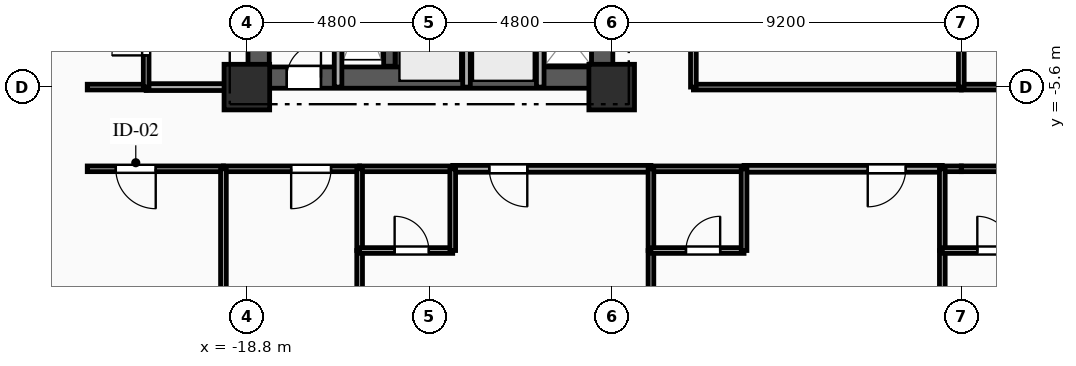
"""IFC4 building model, lengths in metres.
Left out: names, types, materials, properties, quantities, classifications, styles, units other than length and angle.
Written with IfcOpenShell. Run it as: python <this file> out.ifc"""

import sys

from ifc_helpers import new_model, si_unit, direction, frame, frame_2d, origin, origin_2d, place, context, subcontext, project, spatial, rectangle, extrude, element, fill, save


model = new_model("IFC4")
c1 = context("Model", 3, precision=1e-05, world=origin(), true_north=direction((0.0, 1.0)))
c2 = subcontext(c1, "Body", "Model", "MODEL_VIEW")
j1 = project(units=[si_unit("LENGTHUNIT", "METRE"), si_unit("PLANEANGLEUNIT", "RADIAN")], contexts=[c1])
p1 = place(None, origin())
s1 = spatial("IfcSite", under=j1, at=p1, CompositionType="ELEMENT")
p2 = place(p1, origin())
s2 = spatial("IfcBuilding", under=s1, at=p2, CompositionType="ELEMENT")
p3 = place(p2, frame((0.0, 0.0, 30.35)))
s3 = spatial("IfcBuildingStorey", under=s2, at=p3, CompositionType="ELEMENT", Elevation=30.35)
for number, where, z_axis, x_axis in (
    (1, (-18.8, -5.6, 0.0), (0.0, 0.0, 1.0), (1.0, 0.0, 0.0)),
    (2, (-9.2, -5.6, 0.0), (0.0, 0.0, 1.0), (1.0, 0.0, 0.0)),
):
    element("IfcColumn", number, at=place(p3, frame(where, z_axis=z_axis, x_axis=x_axis)), inside=s3, PredefinedType="COLUMN", context=c2, shape_type="SweptSolid", body=[
        extrude(rectangle(XDim=1.2, YDim=1.2, at=origin_2d()), origin(), (0.0, 0.0, 1.0), 3.35),
    ])
p4 = place(p3, frame((-18.8, -5.35, 0.0), z_axis=(0.0, 0.0, 1.0), x_axis=(1.0, 0.0, 0.0)))
e3 = element("IfcWall", 3, at=p4, inside=s3, PredefinedType="SHEAR", context=c2, shape_type="SweptSolid", body=[
    extrude(rectangle(XDim=9.6, YDim=0.56, at=frame_2d((4.8, 0.0))), origin(), (0.0, 0.0, 1.0), 3.035),
])
p5 = place(p4, frame((1.05, 0.0, 0.0)))
e4 = element("IfcOpeningElement", 4, at=p5, cuts=e3, PredefinedType="OPENING", context=c2, shape_type="SweptSolid", body=[
    extrude(rectangle(XDim=0.9, YDim=2.1, at=frame_2d((0.45, 1.05))), frame((0.0, 0.29, 0.0), z_axis=(0.0, -1.0, 0.0), x_axis=(1.0, 0.0, 0.0)), (0.0, 0.0, 1.0), 0.58),
])
p6 = place(p3, frame((-18.49, -5.05, 0.0), z_axis=(0.0, 0.0, 1.0), x_axis=(0.0, 1.0, 0.0)))
e5 = element("IfcWall", 5, at=p6, inside=s3, PredefinedType="SHEAR", context=c2, shape_type="SweptSolid", body=[
    extrude(rectangle(XDim=10.1, YDim=0.56, at=frame_2d((5.05, 0.0))), origin(), (0.0, 0.0, 1.0), 3.035),
])
p7 = place(p3, frame((-9.45, -5.05, 0.0), z_axis=(0.0, 0.0, 1.0), x_axis=(0.0, 1.0, 0.0)))
e6 = element("IfcWall", 6, at=p7, inside=s3, PredefinedType="SHEAR", context=c2, shape_type="SweptSolid", body=[
    extrude(rectangle(XDim=10.1, YDim=0.56, at=frame_2d((5.05, 0.0))), origin(), (0.0, 0.0, 1.0), 3.035),
])
p8 = place(p7, frame((7.15, 0.0, 0.0)))
e7 = element("IfcOpeningElement", 7, at=p8, cuts=e6, PredefinedType="OPENING", context=c2, shape_type="SweptSolid", body=[
    extrude(rectangle(XDim=0.9, YDim=2.1, at=frame_2d((0.45, 1.05))), frame((0.0, 0.29, 0.0), z_axis=(0.0, -1.0, 0.0), x_axis=(1.0, 0.0, 0.0)), (0.0, 0.0, 1.0), 0.58),
])
p9 = place(p7, frame((2.4, 0.0, 0.0)))
e8 = element("IfcOpeningElement", 8, at=p9, cuts=e6, PredefinedType="OPENING", context=c2, shape_type="SweptSolid", body=[
    extrude(rectangle(XDim=1.2, YDim=2.15, at=frame_2d((0.6, 1.075))), frame((0.0, 0.29, 0.0), z_axis=(0.0, -1.0, 0.0), x_axis=(1.0, 0.0, 0.0)), (0.0, 0.0, 1.0), 0.58),
])
p10 = place(p3, frame((-15.05, -5.05, 0.0), z_axis=(0.0, 0.0, 1.0), x_axis=(0.0, 1.0, 0.0)))
e9 = element("IfcWall", 9, at=p10, inside=s3, PredefinedType="SHEAR", context=c2, shape_type="SweptSolid", body=[
    extrude(rectangle(XDim=10.1, YDim=0.3, at=frame_2d((5.05, 0.0))), origin(), (0.0, 0.0, 1.0), 3.035),
])
p11 = place(p3, frame((-16.4, -5.6, 0.0), z_axis=(0.0, 0.0, 1.0), x_axis=(0.0, 1.0, 0.0)))
e10 = element("IfcWall", 10, at=p11, inside=s3, PredefinedType="PARTITIONING", context=c2, shape_type="SweptSolid", body=[
    extrude(rectangle(XDim=3.49, YDim=0.2, at=frame_2d((1.745, 0.0))), origin(), (0.0, 0.0, 1.0), 3.035),
])
for number, where, z_axis, x_axis in (
    (11, (-13.02, -5.6, 0.0), (0.0, 0.0, 1.0), (0.0, 1.0, 0.0)),
    (12, (-11.08, -5.6, 0.0), (0.0, 0.0, 1.0), (0.0, 1.0, 0.0)),
):
    element("IfcWall", number, at=place(p3, frame(where, z_axis=z_axis, x_axis=x_axis)), inside=s3, PredefinedType="PARTITIONING", context=c2, shape_type="SweptSolid", body=[
        extrude(rectangle(XDim=2.25, YDim=0.2, at=frame_2d((1.125, 0.0))), origin(), (0.0, 0.0, 1.0), 3.035),
    ])
p12 = place(p3, frame((-21.45, -5.6, 0.0), z_axis=(0.0, 0.0, 1.0), x_axis=(1.0, 0.0, 0.0)))
e13 = element("IfcWall", 13, at=p12, inside=s3, PredefinedType="PARTITIONING", context=c2, shape_type="SweptSolid", body=[
    extrude(rectangle(XDim=2.65, YDim=0.18, at=frame_2d((1.325, 0.0))), origin(), (0.0, 0.0, 1.0), 3.035),
])
p13 = place(p3, frame((-23.0, -5.6, 0.0), z_axis=(0.0, 0.0, 1.0), x_axis=(1.0, 0.0, 0.0)))
e14 = element("IfcWall", 14, at=p13, inside=s3, PredefinedType="PLUMBINGWALL", context=c2, shape_type="SweptSolid", body=[
    extrude(rectangle(XDim=1.55, YDim=0.15, at=frame_2d((0.775, 0.0))), origin(), (0.0, 0.0, 1.0), 3.035),
])
p14 = place(p3, frame((-19.417, -7.75, 0.0), z_axis=(0.0, 0.0, 1.0), x_axis=(-1.0, 0.0, 0.0)))
e15 = element("IfcWall", 15, at=p14, inside=s3, PredefinedType="PARTITIONING", context=c2, shape_type="SweptSolid", body=[
    extrude(rectangle(XDim=3.583, YDim=0.15, at=frame_2d((1.792, 0.0))), origin(), (0.0, 0.0, 1.0), 3.035),
])
p15 = place(p14, frame((1.782, 0.0, 0.0)))
e16 = element("IfcOpeningElement", 16, at=p15, cuts=e15, PredefinedType="OPENING", context=c2, shape_type="SweptSolid", body=[
    extrude(rectangle(XDim=1.05, YDim=2.15, at=frame_2d((0.525, 1.075))), frame((0.0, 0.085, 0.0), z_axis=(0.0, -1.0, 0.0), x_axis=(1.0, 0.0, 0.0)), (0.0, 0.0, 1.0), 0.17),
])
p16 = place(p3, frame((-15.833, -7.75, 0.0), z_axis=(0.0, 0.0, 1.0), x_axis=(-1.0, 0.0, 0.0)))
e17 = element("IfcWall", 17, at=p16, inside=s3, PredefinedType="PARTITIONING", context=c2, shape_type="SweptSolid", body=[
    extrude(rectangle(XDim=3.583, YDim=0.15, at=frame_2d((1.792, 0.0))), origin(), (0.0, 0.0, 1.0), 3.035),
])
p17 = place(p16, frame((0.752, 0.0, 0.0)))
e18 = element("IfcOpeningElement", 18, at=p17, cuts=e17, PredefinedType="OPENING", context=c2, shape_type="SweptSolid", body=[
    extrude(rectangle(XDim=1.05, YDim=2.15, at=frame_2d((0.525, 1.075))), frame((0.0, 0.085, 0.0), z_axis=(0.0, -1.0, 0.0), x_axis=(1.0, 0.0, 0.0)), (0.0, 0.0, 1.0), 0.17),
])
p18 = place(p3, frame((-8.167, -7.75, 0.0), z_axis=(0.0, 0.0, 1.0), x_axis=(-1.0, 0.0, 0.0)))
e19 = element("IfcWall", 19, at=p18, inside=s3, PredefinedType="PARTITIONING", context=c2, shape_type="SweptSolid", body=[
    extrude(rectangle(XDim=5.216, YDim=0.18, at=frame_2d((2.608, 0.0))), origin(), (0.0, 0.0, 1.0), 3.035),
])
p19 = place(p18, frame((3.254, 0.0, 0.0)))
e20 = element("IfcOpeningElement", 20, at=p19, cuts=e19, PredefinedType="OPENING", context=c2, shape_type="SweptSolid", body=[
    extrude(rectangle(XDim=1.0, YDim=2.15, at=frame_2d((0.5, 1.075))), frame((0.0, 0.1, 0.0), z_axis=(0.0, -1.0, 0.0), x_axis=(1.0, 0.0, 0.0)), (0.0, 0.0, 1.0), 0.2),
])
p20 = place(p3, frame((-13.383, -7.75, 0.0), z_axis=(0.0, 0.0, 1.0), x_axis=(-1.0, 0.0, 0.0)))
e21 = element("IfcWall", 21, at=p20, inside=s3, PredefinedType="PLUMBINGWALL", context=c2, shape_type="SweptSolid", body=[
    extrude(rectangle(XDim=2.45, YDim=0.15, at=frame_2d((1.225, 0.0))), origin(), (0.0, 0.0, 1.0), 3.035),
])
p21 = place(p3, frame((-0.5, -7.75, 0.0), z_axis=(0.0, 0.0, 1.0), x_axis=(-1.0, 0.0, 0.0)))
e22 = element("IfcWall", 22, at=p21, inside=s3, PredefinedType="PARTITIONING", context=c2, shape_type="SweptSolid", body=[
    extrude(rectangle(XDim=5.217, YDim=0.18, at=frame_2d((2.608, 0.0))), origin(), (0.0, 0.0, 1.0), 3.035),
])
p22 = place(p21, frame((0.962, 0.0, 0.0)))
e23 = element("IfcOpeningElement", 23, at=p22, cuts=e22, PredefinedType="OPENING", context=c2, shape_type="SweptSolid", body=[
    extrude(rectangle(XDim=1.0, YDim=2.15, at=frame_2d((0.5, 1.075))), frame((0.0, 0.1, 0.0), z_axis=(0.0, -1.0, 0.0), x_axis=(1.0, 0.0, 0.0)), (0.0, 0.0, 1.0), 0.2),
])
p23 = place(p3, frame((-5.717, -7.75, 0.0), z_axis=(0.0, 0.0, 1.0), x_axis=(-1.0, 0.0, 0.0)))
e24 = element("IfcWall", 24, at=p23, inside=s3, PredefinedType="PLUMBINGWALL", context=c2, shape_type="SweptSolid", body=[
    extrude(rectangle(XDim=2.45, YDim=0.15, at=frame_2d((1.225, 0.0))), origin(), (0.0, 0.0, 1.0), 3.035),
])
p24 = place(p3, frame((0.0, -7.75, 0.0), z_axis=(0.0, 0.0, 1.0), x_axis=(-1.0, 0.0, 0.0)))
e25 = element("IfcWall", 25, at=p24, inside=s3, PredefinedType="PLUMBINGWALL", context=c2, shape_type="SweptSolid", body=[
    extrude(rectangle(XDim=0.5, YDim=0.15, at=frame_2d((0.25, 0.0))), origin(), (0.0, 0.0, 1.0), 3.035),
])
p25 = place(p3, frame((-7.05, -5.6, 0.0), z_axis=(0.0, 0.0, 1.0), x_axis=(1.0, 0.0, 0.0)))
e26 = element("IfcWall", 26, at=p25, inside=s3, PredefinedType="PARTITIONING", context=c2, shape_type="SweptSolid", body=[
    extrude(rectangle(XDim=7.05, YDim=0.15, at=frame_2d((3.525, 0.0))), origin(), (0.0, 0.0, 1.0), 2.52),
])
p26 = place(p3, frame((1.95, -7.75, 0.0), z_axis=(0.0, 0.0, 1.0), x_axis=(-1.0, 0.0, 0.0)))
e27 = element("IfcWall", 27, at=p26, inside=s3, PredefinedType="PLUMBINGWALL", context=c2, shape_type="SweptSolid", body=[
    extrude(rectangle(XDim=1.95, YDim=0.15, at=frame_2d((0.975, 0.0))), origin(), (0.0, 0.0, 1.0), 3.035),
])
p27 = place(p3, frame((0.0, -5.6, 0.0), z_axis=(0.0, 0.0, 1.0), x_axis=(1.0, 0.0, 0.0)))
e28 = element("IfcWall", 28, at=p27, inside=s3, PredefinedType="PARTITIONING", context=c2, shape_type="SweptSolid", body=[
    extrude(rectangle(XDim=7.05, YDim=0.15, at=frame_2d((3.525, 0.0))), origin(), (0.0, 0.0, 1.0), 2.52),
])
p28 = place(p27, frame((1.185, 0.0, 0.0)))
e29 = element("IfcOpeningElement", 29, at=p28, cuts=e28, PredefinedType="OPENING", context=c2, shape_type="SweptSolid", body=[
    extrude(rectangle(XDim=1.05, YDim=2.15, at=frame_2d((0.525, 1.075))), frame((0.0, 0.085, 0.0), z_axis=(0.0, -1.0, 0.0), x_axis=(1.0, 0.0, 0.0)), (0.0, 0.0, 1.0), 0.17),
])
p29 = place(p3, frame((-7.05, 8.5, 0.0), z_axis=(0.0, 0.0, 1.0), x_axis=(0.0, -1.0, 0.0)))
e30 = element("IfcWall", 30, at=p29, inside=s3, PredefinedType="PARTITIONING", context=c2, shape_type="SweptSolid", body=[
    extrude(rectangle(XDim=14.1, YDim=0.15, at=frame_2d((7.05, 0.0))), origin(), (0.0, 0.0, 1.0), 3.035),
])
p30 = place(p29, frame((8.011, 0.0, 0.0)))
e31 = element("IfcOpeningElement", 31, at=p30, cuts=e30, PredefinedType="OPENING", context=c2, shape_type="SweptSolid", body=[
    extrude(rectangle(XDim=1.05, YDim=2.15, at=frame_2d((0.525, 1.075))), frame((0.0, 0.085, 0.0), z_axis=(0.0, -1.0, 0.0), x_axis=(1.0, 0.0, 0.0)), (0.0, 0.0, 1.0), 0.17),
])
p31 = place(p3, frame((-21.45, -5.6, 0.0), z_axis=(0.0, 0.0, 1.0), x_axis=(0.0, 1.0, 0.0)))
e32 = element("IfcWall", 32, at=p31, inside=s3, PredefinedType="PLUMBINGWALL", context=c2, shape_type="SweptSolid", body=[
    extrude(rectangle(XDim=2.35, YDim=0.15, at=frame_2d((1.175, 0.0))), origin(), (0.0, 0.0, 1.0), 3.035),
])
p32 = place(p31, frame((0.834, 0.0, 0.0)))
e33 = element("IfcOpeningElement", 33, at=p32, cuts=e32, PredefinedType="OPENING", context=c2, shape_type="SweptSolid", body=[
    extrude(rectangle(XDim=0.9, YDim=2.1, at=frame_2d((0.45, 1.05))), frame((0.0, 0.085, 0.0), z_axis=(0.0, -1.0, 0.0), x_axis=(1.0, 0.0, 0.0)), (0.0, 0.0, 1.0), 0.17),
])
p33 = place(p3, frame((-19.417, -7.75, 0.0), z_axis=(0.0, 0.0, 1.0), x_axis=(0.0, -1.0, 0.0)))
e34 = element("IfcWall", 34, at=p33, inside=s3, PredefinedType="PARTITIONING", context=c2, shape_type="SweptSolid", body=[
    extrude(rectangle(XDim=11.65, YDim=0.15, at=frame_2d((5.825, 0.0))), origin(), (0.0, 0.0, 1.0), 3.035),
])
p34 = place(p3, frame((-15.833, -9.9, 0.0), z_axis=(0.0, 0.0, 1.0), x_axis=(0.0, -1.0, 0.0)))
e35 = element("IfcWall", 35, at=p34, inside=s3, PredefinedType="PARTITIONING", context=c2, shape_type="SweptSolid", body=[
    extrude(rectangle(XDim=9.5, YDim=0.15, at=frame_2d((4.75, 0.0))), origin(), (0.0, 0.0, 1.0), 3.035),
])
p35 = place(p3, frame((-15.833, -7.75, 0.0), z_axis=(0.0, 0.0, 1.0), x_axis=(0.0, -1.0, 0.0)))
e36 = element("IfcWall", 36, at=p35, inside=s3, PredefinedType="PLUMBINGWALL", context=c2, shape_type="SweptSolid", body=[
    extrude(rectangle(XDim=2.15, YDim=0.15, at=frame_2d((1.075, 0.0))), origin(), (0.0, 0.0, 1.0), 3.035),
])
p36 = place(p3, frame((-15.833, -9.9, 0.0), z_axis=(0.0, 0.0, 1.0), x_axis=(1.0, 0.0, 0.0)))
e37 = element("IfcWall", 37, at=p36, inside=s3, PredefinedType="PLUMBINGWALL", context=c2, shape_type="SweptSolid", body=[
    extrude(rectangle(XDim=2.45, YDim=0.15, at=frame_2d((1.225, 0.0))), origin(), (0.0, 0.0, 1.0), 3.035),
])
p37 = place(p36, frame((0.921, 0.0, 0.0)))
e38 = element("IfcOpeningElement", 38, at=p37, cuts=e37, PredefinedType="OPENING", context=c2, shape_type="SweptSolid", body=[
    extrude(rectangle(XDim=0.9, YDim=2.1, at=frame_2d((0.45, 1.05))), frame((0.0, 0.085, 0.0), z_axis=(0.0, -1.0, 0.0), x_axis=(1.0, 0.0, 0.0)), (0.0, 0.0, 1.0), 0.17),
])
p38 = place(p3, frame((-13.383, -9.9, 0.0), z_axis=(0.0, 0.0, 1.0), x_axis=(0.0, 1.0, 0.0)))
e39 = element("IfcWall", 39, at=p38, inside=s3, PredefinedType="PLUMBINGWALL", context=c2, shape_type="SweptSolid", body=[
    extrude(rectangle(XDim=2.15, YDim=0.15, at=frame_2d((1.075, 0.0))), origin(), (0.0, 0.0, 1.0), 3.035),
])
p39 = place(p3, frame((-8.167, -9.9, 0.0), z_axis=(0.0, 0.0, 1.0), x_axis=(0.0, -1.0, 0.0)))
e40 = element("IfcWall", 40, at=p39, inside=s3, PredefinedType="PARTITIONING", context=c2, shape_type="SweptSolid", body=[
    extrude(rectangle(XDim=9.5, YDim=0.15, at=frame_2d((4.75, 0.0))), origin(), (0.0, 0.0, 1.0), 3.035),
])
p40 = place(p3, frame((-8.167, -7.75, 0.0), z_axis=(0.0, 0.0, 1.0), x_axis=(0.0, -1.0, 0.0)))
e41 = element("IfcWall", 41, at=p40, inside=s3, PredefinedType="PLUMBINGWALL", context=c2, shape_type="SweptSolid", body=[
    extrude(rectangle(XDim=2.15, YDim=0.15, at=frame_2d((1.075, 0.0))), origin(), (0.0, 0.0, 1.0), 3.035),
])
p41 = place(p3, frame((-8.167, -9.9, 0.0), z_axis=(0.0, 0.0, 1.0), x_axis=(1.0, 0.0, 0.0)))
e42 = element("IfcWall", 42, at=p41, inside=s3, PredefinedType="PLUMBINGWALL", context=c2, shape_type="SweptSolid", body=[
    extrude(rectangle(XDim=2.45, YDim=0.15, at=frame_2d((1.225, 0.0))), origin(), (0.0, 0.0, 1.0), 3.035),
])
p42 = place(p41, frame((0.921, 0.0, 0.0)))
e43 = element("IfcOpeningElement", 43, at=p42, cuts=e42, PredefinedType="OPENING", context=c2, shape_type="SweptSolid", body=[
    extrude(rectangle(XDim=0.9, YDim=2.1, at=frame_2d((0.45, 1.05))), frame((0.0, 0.085, 0.0), z_axis=(0.0, -1.0, 0.0), x_axis=(1.0, 0.0, 0.0)), (0.0, 0.0, 1.0), 0.17),
])
p43 = place(p3, frame((-5.717, -9.9, 0.0), z_axis=(0.0, 0.0, 1.0), x_axis=(0.0, 1.0, 0.0)))
e44 = element("IfcWall", 44, at=p43, inside=s3, PredefinedType="PLUMBINGWALL", context=c2, shape_type="SweptSolid", body=[
    extrude(rectangle(XDim=2.15, YDim=0.15, at=frame_2d((1.075, 0.0))), origin(), (0.0, 0.0, 1.0), 3.035),
])
p44 = place(p3, frame((-0.5, -9.9, 0.0), z_axis=(0.0, 0.0, 1.0), x_axis=(0.0, -1.0, 0.0)))
e45 = element("IfcWall", 45, at=p44, inside=s3, PredefinedType="PARTITIONING", context=c2, shape_type="SweptSolid", body=[
    extrude(rectangle(XDim=9.5, YDim=0.15, at=frame_2d((4.75, 0.0))), origin(), (0.0, 0.0, 1.0), 3.035),
])
p45 = place(p3, frame((-0.5, -7.75, 0.0), z_axis=(0.0, 0.0, 1.0), x_axis=(0.0, -1.0, 0.0)))
e46 = element("IfcWall", 46, at=p45, inside=s3, PredefinedType="PLUMBINGWALL", context=c2, shape_type="SweptSolid", body=[
    extrude(rectangle(XDim=2.15, YDim=0.15, at=frame_2d((1.075, 0.0))), origin(), (0.0, 0.0, 1.0), 3.035),
])
p46 = place(p3, frame((-0.5, -9.9, 0.0), z_axis=(0.0, 0.0, 1.0), x_axis=(1.0, 0.0, 0.0)))
e47 = element("IfcWall", 47, at=p46, inside=s3, PredefinedType="PLUMBINGWALL", context=c2, shape_type="SweptSolid", body=[
    extrude(rectangle(XDim=2.45, YDim=0.15, at=frame_2d((1.225, 0.0))), origin(), (0.0, 0.0, 1.0), 3.035),
])
p47 = place(p46, frame((0.921, 0.0, 0.0)))
e48 = element("IfcOpeningElement", 48, at=p47, cuts=e47, PredefinedType="OPENING", context=c2, shape_type="SweptSolid", body=[
    extrude(rectangle(XDim=0.9, YDim=2.1, at=frame_2d((0.45, 1.05))), frame((0.0, 0.085, 0.0), z_axis=(0.0, -1.0, 0.0), x_axis=(1.0, 0.0, 0.0)), (0.0, 0.0, 1.0), 0.17),
])
p48 = place(p3, frame((0.0, 1.45, 0.0), z_axis=(0.0, 0.0, 1.0), x_axis=(0.0, -1.0, 0.0)))
e49 = element("IfcWall", 49, at=p48, inside=s3, PredefinedType="PARTITIONING", context=c2, shape_type="SweptSolid", body=[
    extrude(rectangle(XDim=7.05, YDim=0.15, at=frame_2d((3.525, 0.0))), origin(), (0.0, 0.0, 1.0), 3.035),
])
p49 = place(p5, origin())
e50 = element("IfcDoor", 50, at=p49, inside=s3, OperationType="SINGLE_SWING_RIGHT", PredefinedType="DOOR", context=c2, shape_type="SweptSolid", body=[
    extrude(rectangle(XDim=0.9, YDim=2.1, at=frame_2d((0.45, 1.05))), frame((0.0, 0.025, 0.0), z_axis=(0.0, -1.0, 0.0), x_axis=(1.0, 0.0, 0.0)), (0.0, 0.0, 1.0), 0.05),
])
fill(e4, e50)
p50 = place(p15, origin())
e51 = element("IfcDoor", 51, at=p50, inside=s3, OperationType="SINGLE_SWING_LEFT", PredefinedType="DOOR", context=c2, shape_type="SweptSolid", body=[
    extrude(rectangle(XDim=1.05, YDim=2.15, at=frame_2d((0.525, 1.075))), frame((0.0, 0.025, 0.0), z_axis=(0.0, -1.0, 0.0), x_axis=(1.0, 0.0, 0.0)), (0.0, 0.0, 1.0), 0.05),
])
fill(e16, e51)
p51 = place(p17, origin())
e52 = element("IfcDoor", 52, at=p51, inside=s3, OperationType="SINGLE_SWING_RIGHT", PredefinedType="DOOR", context=c2, shape_type="SweptSolid", body=[
    extrude(rectangle(XDim=1.05, YDim=2.15, at=frame_2d((0.525, 1.075))), frame((0.0, 0.025, 0.0), z_axis=(0.0, -1.0, 0.0), x_axis=(1.0, 0.0, 0.0)), (0.0, 0.0, 1.0), 0.05),
])
fill(e18, e52)
p52 = place(p19, origin())
e53 = element("IfcDoor", 53, at=p52, inside=s3, OperationType="SINGLE_SWING_LEFT", PredefinedType="DOOR", context=c2, shape_type="SweptSolid", body=[
    extrude(rectangle(XDim=1.0, YDim=2.15, at=frame_2d((0.5, 1.075))), frame((0.0, 0.025, 0.0), z_axis=(0.0, -1.0, 0.0), x_axis=(1.0, 0.0, 0.0)), (0.0, 0.0, 1.0), 0.05),
])
fill(e20, e53)
p53 = place(p22, origin())
e54 = element("IfcDoor", 54, at=p53, inside=s3, OperationType="SINGLE_SWING_RIGHT", PredefinedType="DOOR", context=c2, shape_type="SweptSolid", body=[
    extrude(rectangle(XDim=1.0, YDim=2.15, at=frame_2d((0.5, 1.075))), frame((0.0, 0.025, 0.0), z_axis=(0.0, -1.0, 0.0), x_axis=(1.0, 0.0, 0.0)), (0.0, 0.0, 1.0), 0.05),
])
fill(e23, e54)
p54 = place(p32, origin())
e55 = element("IfcDoor", 55, at=p54, inside=s3, OperationType="SINGLE_SWING_LEFT", PredefinedType="DOOR", context=c2, shape_type="SweptSolid", body=[
    extrude(rectangle(XDim=0.9, YDim=2.1, at=frame_2d((0.45, 1.05))), frame((0.0, 0.025, 0.0), z_axis=(0.0, -1.0, 0.0), x_axis=(1.0, 0.0, 0.0)), (0.0, 0.0, 1.0), 0.05),
])
fill(e33, e55)
p55 = place(p37, origin())
e56 = element("IfcDoor", 56, at=p55, inside=s3, OperationType="SINGLE_SWING_LEFT", PredefinedType="DOOR", context=c2, shape_type="SweptSolid", body=[
    extrude(rectangle(XDim=0.9, YDim=2.1, at=frame_2d((0.45, 1.05))), frame((0.0, 0.025, 0.0), z_axis=(0.0, -1.0, 0.0), x_axis=(1.0, 0.0, 0.0)), (0.0, 0.0, 1.0), 0.05),
])
fill(e38, e56)
p56 = place(p42, origin())
e57 = element("IfcDoor", 57, at=p56, inside=s3, OperationType="SINGLE_SWING_RIGHT", PredefinedType="DOOR", context=c2, shape_type="SweptSolid", body=[
    extrude(rectangle(XDim=0.9, YDim=2.1, at=frame_2d((0.45, 1.05))), frame((0.0, 0.025, 0.0), z_axis=(0.0, -1.0, 0.0), x_axis=(1.0, 0.0, 0.0)), (0.0, 0.0, 1.0), 0.05),
])
fill(e43, e57)
p57 = place(p47, origin())
e58 = element("IfcDoor", 58, at=p57, inside=s3, OperationType="SINGLE_SWING_LEFT", PredefinedType="DOOR", context=c2, shape_type="SweptSolid", body=[
    extrude(rectangle(XDim=0.9, YDim=2.1, at=frame_2d((0.45, 1.05))), frame((0.0, 0.025, 0.0), z_axis=(0.0, -1.0, 0.0), x_axis=(1.0, 0.0, 0.0)), (0.0, 0.0, 1.0), 0.05),
])
fill(e48, e58)
save(model, sys.argv[1])
